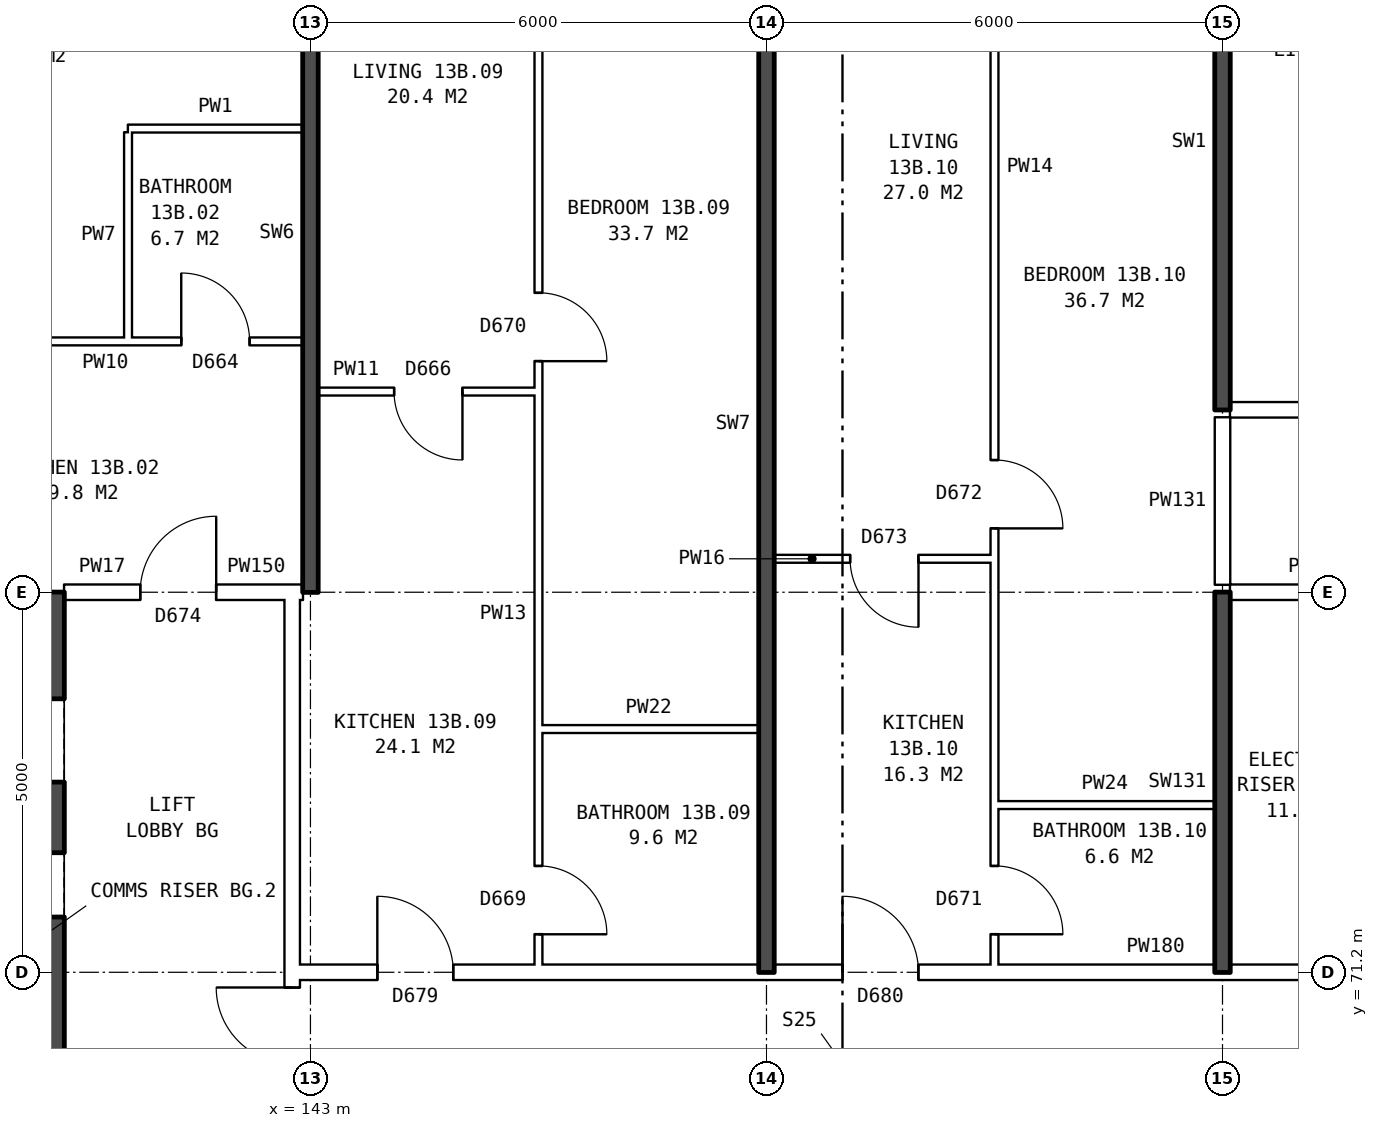
"""IFC4 building model, lengths in metres.
Left out: names, types, materials, properties, quantities, classifications, styles, units other than length and angle.
Written with IfcOpenShell. Run it as: python <this file> out.ifc"""

import sys

from ifc_helpers import new_model, si_unit, direction, frame, frame_2d, origin, place, context, subcontext, project, spatial, rectangle, extrude, element, fill, save


model = new_model("IFC4")
c1 = context("Model", 3, precision=1e-05, world=origin(), true_north=direction((0.0, 1.0)))
c2 = subcontext(c1, "Body", "Model", "MODEL_VIEW")
j1 = project(units=[si_unit("LENGTHUNIT", "METRE"), si_unit("PLANEANGLEUNIT", "RADIAN")], contexts=[c1])
p1 = place(None, origin())
s1 = spatial("IfcSite", under=j1, at=p1, CompositionType="ELEMENT")
p2 = place(p1, origin())
s2 = spatial("IfcBuilding", under=s1, at=p2, CompositionType="ELEMENT")
p3 = place(p2, frame((0.0, 0.0, 50.5)))
s3 = spatial("IfcBuildingStorey", under=s2, at=p3, CompositionType="ELEMENT", Elevation=50.5)
p4 = place(p3, frame((139.36, 64.6, 0.0), z_axis=(0.0, 0.0, 1.0), x_axis=(0.0, 1.0, 0.0)))
e1 = element("IfcWall", 1, at=p4, inside=s3, PredefinedType="SHEAR", context=c2, shape_type="SweptSolid", body=[
    extrude(rectangle(XDim=10.8, YDim=0.8, at=frame_2d((5.4, 0.0))), origin(), (0.0, 0.0, 1.0), 2.85),
])
p5 = place(p4, frame((0.525, 0.0, 0.0)))
e2 = element("IfcOpeningElement", 2, at=p5, cuts=e1, PredefinedType="OPENING", context=c2, shape_type="SweptSolid", body=[
    extrude(rectangle(XDim=1.1, YDim=2.1, at=frame_2d((0.55, 1.05))), frame((0.0, 0.41, 0.0), z_axis=(0.0, -1.0, 0.0), x_axis=(1.0, 0.0, 0.0)), (0.0, 0.0, 1.0), 0.82),
])
p6 = place(p4, frame((9.1, 0.0, 0.0)))
e3 = element("IfcOpeningElement", 3, at=p6, cuts=e1, PredefinedType="OPENING", context=c2, shape_type="SweptSolid", body=[
    extrude(rectangle(XDim=1.1, YDim=2.1, at=frame_2d((0.55, 1.05))), frame((0.0, 0.41, 0.0), z_axis=(0.0, -1.0, 0.0), x_axis=(1.0, 0.0, 0.0)), (0.0, 0.0, 1.0), 0.82),
])
p7 = place(p4, frame((7.325, 0.0, 0.0)))
e4 = element("IfcOpeningElement", 4, at=p7, cuts=e1, PredefinedType="OPENING", context=c2, shape_type="SweptSolid", body=[
    extrude(rectangle(XDim=0.85, YDim=2.1, at=frame_2d((0.425, 1.05))), frame((0.0, 0.41, 0.0), z_axis=(0.0, -1.0, 0.0), x_axis=(1.0, 0.0, 0.0)), (0.0, 0.0, 1.0), 0.82),
])
p8 = place(p3, frame((139.76, 75.8, 0.0), z_axis=(0.0, 0.0, 1.0), x_axis=(-1.0, 0.0, 0.0)))
e5 = element("IfcWall", 5, at=p8, inside=s3, PredefinedType="SHEAR", context=c2, shape_type="SweptSolid", body=[
    extrude(rectangle(XDim=8.4, YDim=0.8, at=frame_2d((4.2, 0.0))), origin(), (0.0, 0.0, 1.0), 2.85),
])
p9 = place(p3, frame((142.76, 63.9, 0.0), z_axis=(0.0, 0.0, 1.0), x_axis=(0.0, 1.0, 0.0)))
e6 = element("IfcWall", 6, at=p9, inside=s3, PredefinedType="PARTITIONING", context=c2, shape_type="SweptSolid", body=[
    extrude(rectangle(XDim=12.2, YDim=0.2, at=frame_2d((6.1, 0.0))), origin(), (0.0, 0.0, 1.0), 2.85),
])
p10 = place(p9, frame((5.1, 0.0, 0.0)))
e7 = element("IfcOpeningElement", 7, at=p10, cuts=e6, PredefinedType="OPENING", context=c2, shape_type="SweptSolid", body=[
    extrude(rectangle(XDim=2.0, YDim=2.1, at=frame_2d((1.0, 1.05))), frame((0.0, 0.11, 0.0), z_axis=(0.0, -1.0, 0.0), x_axis=(1.0, 0.0, 0.0)), (0.0, 0.0, 1.0), 0.22),
])
p11 = place(p3, frame((142.76, 71.2, 0.0), z_axis=(0.0, 0.0, 1.0), x_axis=(1.0, 0.0, 0.0)))
e8 = element("IfcWall", 8, at=p11, inside=s3, PredefinedType="PARTITIONING", context=c2, shape_type="SweptSolid", body=[
    extrude(rectangle(XDim=14.48, YDim=0.2, at=frame_2d((7.24, 0.0))), origin(), (0.0, 0.0, 1.0), 2.85),
])
p12 = place(p11, frame((1.12, 0.0, 0.0)))
e9 = element("IfcOpeningElement", 9, at=p12, cuts=e8, PredefinedType="OPENING", context=c2, shape_type="SweptSolid", body=[
    extrude(rectangle(XDim=1.0, YDim=2.1, at=frame_2d((0.5, 1.05))), frame((0.0, 0.11, 0.0), z_axis=(0.0, -1.0, 0.0), x_axis=(1.0, 0.0, 0.0)), (0.0, 0.0, 1.0), 0.22),
])
p13 = place(p11, frame((7.24, 0.0, 0.0)))
e10 = element("IfcOpeningElement", 10, at=p13, cuts=e8, PredefinedType="OPENING", context=c2, shape_type="SweptSolid", body=[
    extrude(rectangle(XDim=1.0, YDim=2.1, at=frame_2d((0.5, 1.05))), frame((0.0, 0.11, 0.0), z_axis=(0.0, -1.0, 0.0), x_axis=(1.0, 0.0, 0.0)), (0.0, 0.0, 1.0), 0.22),
])
for number, where, z_axis, x_axis in (
    (11, (152.0, 73.4, 0.0), (0.0, 0.0, 1.0), (1.0, 0.0, 0.0)),
    (12, (146.0, 74.4, 0.0), (0.0, 0.0, 1.0), (1.0, 0.0, 0.0)),
):
    element("IfcWall", number, at=place(p3, frame(where, z_axis=z_axis, x_axis=x_axis)), inside=s3, PredefinedType="PARTITIONING", context=c2, shape_type="SweptSolid", body=[
        extrude(rectangle(XDim=2.9, YDim=0.1, at=frame_2d((1.45, 0.0))), origin(), (0.0, 0.0, 1.0), 2.85),
    ])
p14 = place(p3, frame((139.76, 76.2, 0.0), z_axis=(0.0, 0.0, 1.0), x_axis=(1.0, 0.0, 0.0)))
e13 = element("IfcWall", 13, at=p14, inside=s3, PredefinedType="PARTITIONING", context=c2, shape_type="SweptSolid", body=[
    extrude(rectangle(XDim=3.0, YDim=0.2, at=frame_2d((1.5, 0.0))), origin(), (0.0, 0.0, 1.0), 2.85),
])
p15 = place(p14, frame((1.0, 0.0, 0.0)))
e14 = element("IfcOpeningElement", 14, at=p15, cuts=e13, PredefinedType="OPENING", context=c2, shape_type="SweptSolid", body=[
    extrude(rectangle(XDim=1.0, YDim=2.1, at=frame_2d((0.5, 1.05))), frame((0.0, 0.11, 0.0), z_axis=(0.0, -1.0, 0.0), x_axis=(1.0, 0.0, 0.0)), (0.0, 0.0, 1.0), 0.22),
])
p16 = place(p3, frame((142.76, 76.2, 0.0), z_axis=(0.0, 0.0, 1.0), x_axis=(1.0, 0.0, 0.0)))
e15 = element("IfcWall", 15, at=p16, inside=s3, PredefinedType="PARTITIONING", context=c2, shape_type="SweptSolid", body=[
    extrude(rectangle(XDim=0.14, YDim=0.2, at=frame_2d((0.07, 0.0))), origin(), (0.0, 0.0, 1.0), 2.85),
])
p17 = place(p3, frame((155.1, 76.2, 0.0), z_axis=(0.0, 0.0, 1.0), x_axis=(1.0, 0.0, 0.0)))
e16 = element("IfcWall", 16, at=p17, inside=s3, PredefinedType="PARTITIONING", context=c2, shape_type="SweptSolid", body=[
    extrude(rectangle(XDim=2.14, YDim=0.2, at=frame_2d((1.07, 0.0))), origin(), (0.0, 0.0, 1.0), 2.85),
])
p18 = place(p3, frame((149.1, 76.64, 0.0), z_axis=(0.0, 0.0, 1.0), x_axis=(1.0, 0.0, 0.0)))
e17 = element("IfcWall", 17, at=p18, inside=s3, PredefinedType="PARTITIONING", context=c2, shape_type="SweptSolid", body=[
    extrude(rectangle(XDim=2.9, YDim=0.1, at=frame_2d((1.45, 0.0))), origin(), (0.0, 0.0, 1.0), 2.85),
])
p19 = place(p18, frame((1.0, 0.0, 0.0)))
e18 = element("IfcOpeningElement", 18, at=p19, cuts=e17, PredefinedType="OPENING", context=c2, shape_type="SweptSolid", body=[
    extrude(rectangle(XDim=0.9, YDim=2.1, at=frame_2d((0.45, 1.05))), frame((0.0, 0.06, 0.0), z_axis=(0.0, -1.0, 0.0), x_axis=(1.0, 0.0, 0.0)), (0.0, 0.0, 1.0), 0.12),
])
p20 = place(p3, frame((155.1, 78.6, 0.0), z_axis=(0.0, 0.0, 1.0), x_axis=(1.0, 0.0, 0.0)))
e19 = element("IfcWall", 19, at=p20, inside=s3, PredefinedType="PARTITIONING", context=c2, shape_type="SweptSolid", body=[
    extrude(rectangle(XDim=21.04, YDim=0.2, at=frame_2d((10.52, 0.0))), origin(), (0.0, 0.0, 1.0), 2.85),
])
p21 = place(p20, frame((2.45, 0.0, 0.0)))
e20 = element("IfcOpeningElement", 20, at=p21, cuts=e19, PredefinedType="OPENING", context=c2, shape_type="SweptSolid", body=[
    extrude(rectangle(XDim=1.0, YDim=2.1, at=frame_2d((0.5, 1.05))), frame((0.0, 0.11, 0.0), z_axis=(0.0, -1.0, 0.0), x_axis=(1.0, 0.0, 0.0)), (0.0, 0.0, 1.0), 0.22),
])
p22 = place(p20, frame((14.4, 0.0, 0.0)))
e21 = element("IfcOpeningElement", 21, at=p22, cuts=e19, PredefinedType="OPENING", context=c2, shape_type="SweptSolid", body=[
    extrude(rectangle(XDim=1.0, YDim=2.1, at=frame_2d((0.5, 1.05))), frame((0.0, 0.11, 0.0), z_axis=(0.0, -1.0, 0.0), x_axis=(1.0, 0.0, 0.0)), (0.0, 0.0, 1.0), 0.22),
])
p23 = place(p3, frame((143.1, 78.84, 0.0), z_axis=(0.0, 0.0, 1.0), x_axis=(1.0, 0.0, 0.0)))
e22 = element("IfcWall", 22, at=p23, inside=s3, PredefinedType="PARTITIONING", context=c2, shape_type="SweptSolid", body=[
    extrude(rectangle(XDim=2.9, YDim=0.1, at=frame_2d((1.45, 0.0))), origin(), (0.0, 0.0, 1.0), 2.85),
])
p24 = place(p23, frame((1.0, 0.0, 0.0)))
e23 = element("IfcOpeningElement", 23, at=p24, cuts=e22, PredefinedType="OPENING", context=c2, shape_type="SweptSolid", body=[
    extrude(rectangle(XDim=0.9, YDim=2.1, at=frame_2d((0.45, 1.05))), frame((0.0, 0.06, 0.0), z_axis=(0.0, -1.0, 0.0), x_axis=(1.0, 0.0, 0.0)), (0.0, 0.0, 1.0), 0.12),
])
p25 = place(p3, frame((137.1, 79.5, 0.0), z_axis=(0.0, 0.0, 1.0), x_axis=(1.0, 0.0, 0.0)))
e24 = element("IfcWall", 24, at=p25, inside=s3, PredefinedType="PARTITIONING", context=c2, shape_type="SweptSolid", body=[
    extrude(rectangle(XDim=5.8, YDim=0.1, at=frame_2d((2.9, 0.0))), origin(), (0.0, 0.0, 1.0), 2.85),
])
p26 = place(p25, frame((1.3, 0.0, 0.0)))
e25 = element("IfcOpeningElement", 25, at=p26, cuts=e24, PredefinedType="OPENING", context=c2, shape_type="SweptSolid", body=[
    extrude(rectangle(XDim=0.9, YDim=2.1, at=frame_2d((0.45, 1.05))), frame((0.0, 0.06, 0.0), z_axis=(0.0, -1.0, 0.0), x_axis=(1.0, 0.0, 0.0)), (0.0, 0.0, 1.0), 0.12),
])
p27 = place(p25, frame((4.2, 0.0, 0.0)))
e26 = element("IfcOpeningElement", 26, at=p27, cuts=e24, PredefinedType="OPENING", context=c2, shape_type="SweptSolid", body=[
    extrude(rectangle(XDim=0.9, YDim=2.1, at=frame_2d((0.45, 1.05))), frame((0.0, 0.06, 0.0), z_axis=(0.0, -1.0, 0.0), x_axis=(1.0, 0.0, 0.0)), (0.0, 0.0, 1.0), 0.12),
])
p28 = place(p3, frame((140.6, 82.3, 0.0), z_axis=(0.0, 0.0, 1.0), x_axis=(1.0, 0.0, 0.0)))
e27 = element("IfcWall", 27, at=p28, inside=s3, PredefinedType="PARTITIONING", context=c2, shape_type="SweptSolid", body=[
    extrude(rectangle(XDim=2.3, YDim=0.1, at=frame_2d((1.15, 0.0))), origin(), (0.0, 0.0, 1.0), 2.85),
])
p29 = place(p3, frame((140.6, 79.55, 0.0), z_axis=(0.0, 0.0, 1.0), x_axis=(0.0, 1.0, 0.0)))
e28 = element("IfcWall", 28, at=p29, inside=s3, PredefinedType="PARTITIONING", context=c2, shape_type="SweptSolid", body=[
    extrude(rectangle(XDim=2.7, YDim=0.1, at=frame_2d((1.35, 0.0))), origin(), (0.0, 0.0, 1.0), 2.85),
])
p30 = place(p3, frame((143.0, 76.2, 0.0), z_axis=(0.0, 0.0, 1.0), x_axis=(0.0, 1.0, 0.0)))
e29 = element("IfcWall", 29, at=p30, inside=s3, PredefinedType="SOLIDWALL", context=c2, shape_type="SweptSolid", body=[
    extrude(rectangle(XDim=9.44, YDim=0.2, at=frame_2d((4.72, 0.0))), origin(), (0.0, 0.0, 1.0), 2.85),
])
p31 = place(p3, frame((146.0, 71.3, 0.0), z_axis=(0.0, 0.0, 1.0), x_axis=(0.0, 1.0, 0.0)))
e30 = element("IfcWall", 30, at=p31, inside=s3, PredefinedType="PARTITIONING", context=c2, shape_type="SweptSolid", body=[
    extrude(rectangle(XDim=14.34, YDim=0.1, at=frame_2d((7.17, 0.0))), origin(), (0.0, 0.0, 1.0), 2.85),
])
p32 = place(p31, frame((7.94, 0.0, 0.0)))
e31 = element("IfcOpeningElement", 31, at=p32, cuts=e30, PredefinedType="OPENING", context=c2, shape_type="SweptSolid", body=[
    extrude(rectangle(XDim=0.9, YDim=2.1, at=frame_2d((0.45, 1.05))), frame((0.0, 0.06, 0.0), z_axis=(0.0, -1.0, 0.0), x_axis=(1.0, 0.0, 0.0)), (0.0, 0.0, 1.0), 0.12),
])
p33 = place(p31, frame((0.4, 0.0, 0.0)))
e32 = element("IfcOpeningElement", 32, at=p33, cuts=e30, PredefinedType="OPENING", context=c2, shape_type="SweptSolid", body=[
    extrude(rectangle(XDim=0.9, YDim=2.1, at=frame_2d((0.45, 1.05))), frame((0.0, 0.06, 0.0), z_axis=(0.0, -1.0, 0.0), x_axis=(1.0, 0.0, 0.0)), (0.0, 0.0, 1.0), 0.12),
])
p34 = place(p3, frame((149.0, 71.2, 0.0), z_axis=(0.0, 0.0, 1.0), x_axis=(0.0, 1.0, 0.0)))
e33 = element("IfcWall", 33, at=p34, inside=s3, PredefinedType="SOLIDWALL", context=c2, shape_type="SweptSolid", body=[
    extrude(rectangle(XDim=14.44, YDim=0.2, at=frame_2d((7.22, 0.0))), origin(), (0.0, 0.0, 1.0), 2.85),
])
p35 = place(p3, frame((152.0, 71.3, 0.0), z_axis=(0.0, 0.0, 1.0), x_axis=(0.0, 1.0, 0.0)))
e34 = element("IfcWall", 34, at=p35, inside=s3, PredefinedType="PARTITIONING", context=c2, shape_type="SweptSolid", body=[
    extrude(rectangle(XDim=14.34, YDim=0.1, at=frame_2d((7.17, 0.0))), origin(), (0.0, 0.0, 1.0), 2.85),
])
p36 = place(p35, frame((5.74, 0.0, 0.0)))
e35 = element("IfcOpeningElement", 35, at=p36, cuts=e34, PredefinedType="OPENING", context=c2, shape_type="SweptSolid", body=[
    extrude(rectangle(XDim=0.9, YDim=2.1, at=frame_2d((0.45, 1.05))), frame((0.0, 0.06, 0.0), z_axis=(0.0, -1.0, 0.0), x_axis=(1.0, 0.0, 0.0)), (0.0, 0.0, 1.0), 0.12),
])
p37 = place(p35, frame((0.4, 0.0, 0.0)))
e36 = element("IfcOpeningElement", 36, at=p37, cuts=e34, PredefinedType="OPENING", context=c2, shape_type="SweptSolid", body=[
    extrude(rectangle(XDim=0.9, YDim=2.1, at=frame_2d((0.45, 1.05))), frame((0.0, 0.06, 0.0), z_axis=(0.0, -1.0, 0.0), x_axis=(1.0, 0.0, 0.0)), (0.0, 0.0, 1.0), 0.12),
])
p38 = place(p3, frame((155.0, 71.2, 0.0), z_axis=(0.0, 0.0, 1.0), x_axis=(0.0, 1.0, 0.0)))
e37 = element("IfcWall", 37, at=p38, inside=s3, PredefinedType="SOLIDWALL", context=c2, shape_type="SweptSolid", body=[
    extrude(rectangle(XDim=5.0, YDim=0.2, at=frame_2d((2.5, 0.0))), origin(), (0.0, 0.0, 1.0), 2.85),
])
p39 = place(p3, frame((155.0, 76.3, 0.0), z_axis=(0.0, 0.0, 1.0), x_axis=(0.0, 1.0, 0.0)))
e38 = element("IfcWall", 38, at=p39, inside=s3, PredefinedType="PARTITIONING", context=c2, shape_type="SweptSolid", body=[
    extrude(rectangle(XDim=2.2, YDim=0.2, at=frame_2d((1.1, 0.0))), origin(), (0.0, 0.0, 1.0), 2.85),
])
p40 = place(p3, frame((155.0, 78.6, 0.0), z_axis=(0.0, 0.0, 1.0), x_axis=(0.0, 1.0, 0.0)))
e39 = element("IfcWall", 39, at=p40, inside=s3, PredefinedType="SOLIDWALL", context=c2, shape_type="SweptSolid", body=[
    extrude(rectangle(XDim=7.04, YDim=0.2, at=frame_2d((3.52, 0.0))), origin(), (0.0, 0.0, 1.0), 2.85),
])
p41 = place(p10, origin())
e40 = element("IfcDoor", 40, at=p41, inside=s3, OperationType="DOUBLE_DOOR_SINGLE_SWING", PredefinedType="DOOR", context=c2, shape_type="SweptSolid", body=[
    extrude(rectangle(XDim=2.0, YDim=2.1, at=frame_2d((1.0, 1.05))), frame((0.0, 0.025, 0.0), z_axis=(0.0, -1.0, 0.0), x_axis=(1.0, 0.0, 0.0)), (0.0, 0.0, 1.0), 0.05),
])
fill(e7, e40)
p42 = place(p15, origin())
e41 = element("IfcDoor", 41, at=p42, inside=s3, OperationType="SINGLE_SWING_RIGHT", PredefinedType="DOOR", context=c2, shape_type="SweptSolid", body=[
    extrude(rectangle(XDim=1.0, YDim=2.1, at=frame_2d((0.5, 1.05))), frame((0.0, 0.025, 0.0), z_axis=(0.0, -1.0, 0.0), x_axis=(1.0, 0.0, 0.0)), (0.0, 0.0, 1.0), 0.05),
])
fill(e14, e41)
p43 = place(p27, origin())
e42 = element("IfcDoor", 42, at=p43, inside=s3, OperationType="SINGLE_SWING_LEFT", PredefinedType="DOOR", context=c2, shape_type="SweptSolid", body=[
    extrude(rectangle(XDim=0.9, YDim=2.1, at=frame_2d((0.45, 1.05))), frame((0.0, 0.025, 0.0), z_axis=(0.0, -1.0, 0.0), x_axis=(1.0, 0.0, 0.0)), (0.0, 0.0, 1.0), 0.05),
])
fill(e26, e42)
p44 = place(p32, frame((0.9, 0.0, 0.0), z_axis=(0.0, 0.0, 1.0), x_axis=(-1.0, 0.0, 0.0)))
e43 = element("IfcDoor", 43, at=p44, inside=s3, OperationType="SINGLE_SWING_RIGHT", PredefinedType="DOOR", context=c2, shape_type="SweptSolid", body=[
    extrude(rectangle(XDim=0.9, YDim=2.1, at=frame_2d((0.45, 1.05))), frame((0.0, 0.025, 0.0), z_axis=(0.0, -1.0, 0.0), x_axis=(1.0, 0.0, 0.0)), (0.0, 0.0, 1.0), 0.05),
])
fill(e31, e43)
p45 = place(p12, origin())
e44 = element("IfcDoor", 44, at=p45, inside=s3, OperationType="SINGLE_SWING_LEFT", PredefinedType="DOOR", context=c2, shape_type="SweptSolid", body=[
    extrude(rectangle(XDim=1.0, YDim=2.1, at=frame_2d((0.5, 1.05))), frame((0.0, 0.025, 0.0), z_axis=(0.0, -1.0, 0.0), x_axis=(1.0, 0.0, 0.0)), (0.0, 0.0, 1.0), 0.05),
])
fill(e9, e44)
p46 = place(p24, frame((0.9, 0.0, 0.0), z_axis=(0.0, 0.0, 1.0), x_axis=(-1.0, 0.0, 0.0)))
e45 = element("IfcDoor", 45, at=p46, inside=s3, OperationType="SINGLE_SWING_LEFT", PredefinedType="DOOR", context=c2, shape_type="SweptSolid", body=[
    extrude(rectangle(XDim=0.9, YDim=2.1, at=frame_2d((0.45, 1.05))), frame((0.0, 0.025, 0.0), z_axis=(0.0, -1.0, 0.0), x_axis=(1.0, 0.0, 0.0)), (0.0, 0.0, 1.0), 0.05),
])
fill(e23, e45)
p47 = place(p33, frame((0.9, 0.0, 0.0), z_axis=(0.0, 0.0, 1.0), x_axis=(-1.0, 0.0, 0.0)))
e46 = element("IfcDoor", 46, at=p47, inside=s3, OperationType="SINGLE_SWING_RIGHT", PredefinedType="DOOR", context=c2, shape_type="SweptSolid", body=[
    extrude(rectangle(XDim=0.9, YDim=2.1, at=frame_2d((0.45, 1.05))), frame((0.0, 0.025, 0.0), z_axis=(0.0, -1.0, 0.0), x_axis=(1.0, 0.0, 0.0)), (0.0, 0.0, 1.0), 0.05),
])
fill(e32, e46)
p48 = place(p36, frame((0.9, 0.0, 0.0), z_axis=(0.0, 0.0, 1.0), x_axis=(-1.0, 0.0, 0.0)))
e47 = element("IfcDoor", 47, at=p48, inside=s3, OperationType="SINGLE_SWING_RIGHT", PredefinedType="DOOR", context=c2, shape_type="SweptSolid", body=[
    extrude(rectangle(XDim=0.9, YDim=2.1, at=frame_2d((0.45, 1.05))), frame((0.0, 0.025, 0.0), z_axis=(0.0, -1.0, 0.0), x_axis=(1.0, 0.0, 0.0)), (0.0, 0.0, 1.0), 0.05),
])
fill(e35, e47)
p49 = place(p13, origin())
e48 = element("IfcDoor", 48, at=p49, inside=s3, OperationType="SINGLE_SWING_LEFT", PredefinedType="DOOR", context=c2, shape_type="SweptSolid", body=[
    extrude(rectangle(XDim=1.0, YDim=2.1, at=frame_2d((0.5, 1.05))), frame((0.0, 0.025, 0.0), z_axis=(0.0, -1.0, 0.0), x_axis=(1.0, 0.0, 0.0)), (0.0, 0.0, 1.0), 0.05),
])
fill(e10, e48)
p50 = place(p19, frame((0.9, 0.0, 0.0), z_axis=(0.0, 0.0, 1.0), x_axis=(-1.0, 0.0, 0.0)))
e49 = element("IfcDoor", 49, at=p50, inside=s3, OperationType="SINGLE_SWING_LEFT", PredefinedType="DOOR", context=c2, shape_type="SweptSolid", body=[
    extrude(rectangle(XDim=0.9, YDim=2.1, at=frame_2d((0.45, 1.05))), frame((0.0, 0.025, 0.0), z_axis=(0.0, -1.0, 0.0), x_axis=(1.0, 0.0, 0.0)), (0.0, 0.0, 1.0), 0.05),
])
fill(e18, e49)
p51 = place(p37, frame((0.9, 0.0, 0.0), z_axis=(0.0, 0.0, 1.0), x_axis=(-1.0, 0.0, 0.0)))
e50 = element("IfcDoor", 50, at=p51, inside=s3, OperationType="SINGLE_SWING_RIGHT", PredefinedType="DOOR", context=c2, shape_type="SweptSolid", body=[
    extrude(rectangle(XDim=0.9, YDim=2.1, at=frame_2d((0.45, 1.05))), frame((0.0, 0.025, 0.0), z_axis=(0.0, -1.0, 0.0), x_axis=(1.0, 0.0, 0.0)), (0.0, 0.0, 1.0), 0.05),
])
fill(e36, e50)
save(model, sys.argv[1])
